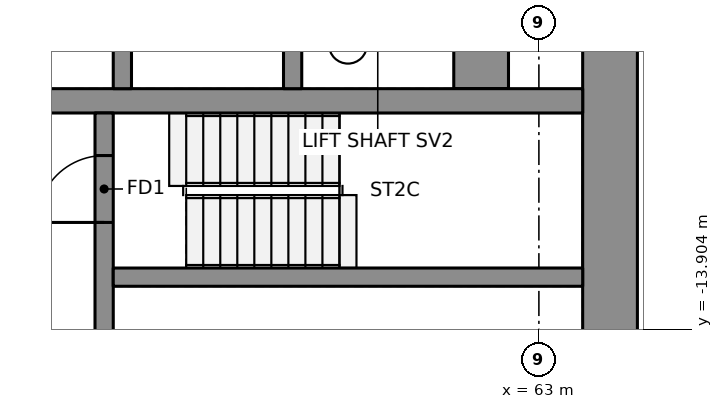
"""IFC4 building model, lengths in metres.
Left out: names, types, materials, properties, quantities, classifications, styles, units other than length and angle.
Written with IfcOpenShell. Run it as: python <this file> out.ifc"""

import sys

from ifc_helpers import new_model, si_unit, direction, frame, frame_2d, origin, place, context, subcontext, project, spatial, rectangle, extrude, element, fill, save


model = new_model("IFC4")
c1 = context("Model", 3, precision=1e-05, world=origin(), true_north=direction((0.0, 1.0)))
c2 = subcontext(c1, "Body", "Model", "MODEL_VIEW")
j1 = project(units=[si_unit("LENGTHUNIT", "METRE"), si_unit("PLANEANGLEUNIT", "RADIAN")], contexts=[c1])
p1 = place(None, origin())
s1 = spatial("IfcSite", under=j1, at=p1, CompositionType="ELEMENT")
p2 = place(p1, origin())
s2 = spatial("IfcBuilding", under=s1, at=p2, CompositionType="ELEMENT")
p3 = place(p2, frame((0.0, 0.0, 155.05)))
s3 = spatial("IfcBuildingStorey", under=s2, at=p3, CompositionType="ELEMENT", Elevation=155.05)
p4 = place(p3, frame((64.17, -15.75, 0.0), z_axis=(0.0, 0.0, 1.0), x_axis=(0.0, 1.0, 0.0)))
e1 = element("IfcWall", 1, at=p4, inside=s3, PredefinedType="SHEAR", context=c2, shape_type="SweptSolid", body=[
    extrude(rectangle(XDim=7.005, YDim=0.9, at=frame_2d((3.503, 0.0))), origin(), (0.0, 0.0, 1.0), 3.55),
])
p5 = place(p3, frame((62.05, -9.95, 0.0), z_axis=(0.0, 0.0, 1.0), x_axis=(0.0, 1.0, 0.0)))
e2 = element("IfcWall", 2, at=p5, inside=s3, PredefinedType="SHEAR", context=c2, shape_type="SweptSolid", body=[
    extrude(rectangle(XDim=19.9, YDim=0.9, at=frame_2d((9.95, 0.0))), origin(), (0.0, 0.0, 1.0), 3.55),
])
p6 = place(p3, frame((50.7, -10.15, 0.0), z_axis=(0.0, 0.0, 1.0), x_axis=(1.0, 0.0, 0.0)))
e3 = element("IfcWall", 3, at=p6, inside=s3, PredefinedType="SHEAR", context=c2, shape_type="SweptSolid", body=[
    extrude(rectangle(XDim=13.02, YDim=0.4, at=frame_2d((6.51, 0.0))), origin(), (0.0, 0.0, 1.0), 3.55),
])
for number, where, z_axis, x_axis in (
    (4, (56.15, -9.95, 0.0), (0.0, 0.0, 1.0), (0.0, 1.0, 0.0)),
    (5, (58.95, -9.95, 0.0), (0.0, 0.0, 1.0), (0.0, 1.0, 0.0)),
):
    element("IfcWall", number, at=place(p3, frame(where, z_axis=z_axis, x_axis=x_axis)), inside=s3, PredefinedType="SHEAR", context=c2, shape_type="SweptSolid", body=[
        extrude(rectangle(XDim=3.0, YDim=0.3, at=frame_2d((1.5, 0.0))), origin(), (0.0, 0.0, 1.0), 3.55),
    ])
p7 = place(p3, frame((55.85, -15.75, 0.0), z_axis=(0.0, 0.0, 1.0), x_axis=(0.0, 1.0, 0.0)))
e6 = element("IfcWall", 6, at=p7, inside=s3, PredefinedType="SHEAR", context=c2, shape_type="SweptSolid", body=[
    extrude(rectangle(XDim=5.4, YDim=0.3, at=frame_2d((2.7, 0.0))), origin(), (0.0, 0.0, 1.0), 3.55),
])
p8 = place(p7, frame((3.6, 0.0, 0.0)))
e7 = element("IfcOpeningElement", 7, at=p8, cuts=e6, PredefinedType="OPENING", context=c2, shape_type="SweptSolid", body=[
    extrude(rectangle(XDim=1.1, YDim=2.1, at=frame_2d((0.55, 1.05))), frame((0.0, 0.16, 0.0), z_axis=(0.0, -1.0, 0.0), x_axis=(1.0, 0.0, 0.0)), (0.0, 0.0, 1.0), 0.32),
])
p9 = place(p7, frame((0.8, 0.0, 0.0)))
e8 = element("IfcOpeningElement", 8, at=p9, cuts=e6, PredefinedType="OPENING", context=c2, shape_type="SweptSolid", body=[
    extrude(rectangle(XDim=0.9, YDim=2.1, at=frame_2d((0.45, 1.05))), frame((0.0, 0.16, 0.0), z_axis=(0.0, -1.0, 0.0), x_axis=(1.0, 0.0, 0.0)), (0.0, 0.0, 1.0), 0.32),
])
p10 = place(p3, frame((56.0, -13.05, 0.0), z_axis=(0.0, 0.0, 1.0), x_axis=(1.0, 0.0, 0.0)))
e9 = element("IfcWall", 9, at=p10, inside=s3, PredefinedType="SHEAR", context=c2, shape_type="SweptSolid", body=[
    extrude(rectangle(XDim=7.72, YDim=0.3, at=frame_2d((3.86, 0.0))), origin(), (0.0, 0.0, 1.0), 3.55),
])
p11 = place(p8, origin())
e10 = element("IfcDoor", 10, at=p11, inside=s3, OperationType="SINGLE_SWING_RIGHT", PredefinedType="DOOR", context=c2, shape_type="SweptSolid", body=[
    extrude(rectangle(XDim=1.1, YDim=2.1, at=frame_2d((0.55, 1.05))), frame((0.0, 0.025, 0.0), z_axis=(0.0, -1.0, 0.0), x_axis=(1.0, 0.0, 0.0)), (0.0, 0.0, 1.0), 0.05),
])
fill(e7, e10)
save(model, sys.argv[1])
